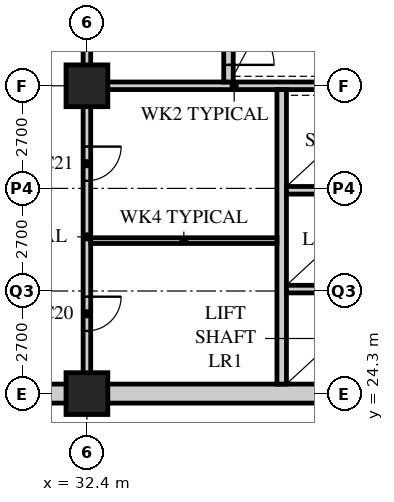
"""IFC4 building model, lengths in metres.
Left out: names, types, materials, properties, quantities, classifications, styles, units other than length and angle.
Written with IfcOpenShell. Run it as: python <this file> out.ifc"""

import sys

from ifc_helpers import new_model, si_unit, direction, frame, frame_2d, origin, origin_2d, place, context, subcontext, project, spatial, rectangle, hollow_rectangle, extrude, element, fill, save


model = new_model("IFC4")
c1 = context("Model", 3, precision=1e-05, world=origin(), true_north=direction((0.0, 1.0)))
c2 = subcontext(c1, "Body", "Model", "MODEL_VIEW")
j1 = project(units=[si_unit("LENGTHUNIT", "METRE"), si_unit("PLANEANGLEUNIT", "RADIAN")], contexts=[c1])
p1 = place(None, origin())
s1 = spatial("IfcSite", under=j1, at=p1, CompositionType="ELEMENT")
p2 = place(p1, origin())
s2 = spatial("IfcBuilding", under=s1, at=p2, CompositionType="ELEMENT")
p3 = place(p2, frame((0.0, 0.0, 106.8)))
s3 = spatial("IfcBuildingStorey", under=s2, at=p3, CompositionType="ELEMENT", Elevation=106.8)
for number, where, z_axis, x_axis in (
    (1, (32.4, 24.3, 0.0), (0.0, 0.0, 1.0), (1.0, 0.0, 0.0)),
    (2, (32.4, 32.4, 0.0), (0.0, 0.0, 1.0), (1.0, 0.0, 0.0)),
):
    element("IfcColumn", number, at=place(p3, frame(where, z_axis=z_axis, x_axis=x_axis)), inside=s3, PredefinedType="COLUMN", context=c2, shape_type="SweptSolid", body=[
        extrude(hollow_rectangle(XDim=1.1, YDim=1.1, WallThickness=0.1, at=origin_2d()), origin(), (0.0, 0.0, 1.0), 3.4),
    ])
p4 = place(p3, frame((15.95, 24.3, 0.0), z_axis=(0.0, 0.0, 1.0), x_axis=(1.0, 0.0, 0.0)))
e3 = element("IfcWall", 3, at=p4, inside=s3, PredefinedType="SOLIDWALL", context=c2, shape_type="SweptSolid", body=[
    extrude(rectangle(XDim=24.8, YDim=0.5, at=frame_2d((12.4, 0.0))), origin(), (0.0, 0.0, 1.0), 2.54),
])
p5 = place(p4, frame((11.5, 0.0, 0.0)))
e4 = element("IfcOpeningElement", 4, at=p5, cuts=e3, PredefinedType="OPENING", context=c2, shape_type="SweptSolid", body=[
    extrude(rectangle(XDim=1.8, YDim=2.4, at=frame_2d((0.9, 1.2))), frame((0.0, 0.26, 0.0), z_axis=(0.0, -1.0, 0.0), x_axis=(1.0, 0.0, 0.0)), (0.0, 0.0, 1.0), 0.52),
])
p6 = place(p3, frame((32.3, 32.4, 0.0), z_axis=(0.0, 0.0, 1.0), x_axis=(1.0, 0.0, 0.0)))
e5 = element("IfcWall", 5, at=p6, inside=s3, PredefinedType="SOLIDWALL", context=c2, shape_type="SweptSolid", body=[
    extrude(rectangle(XDim=7.95, YDim=0.2, at=frame_2d((3.975, 0.0))), origin(), (0.0, 0.0, 1.0), 2.578),
])
p7 = place(p3, frame((32.4, 32.5, 0.0), z_axis=(0.0, 0.0, 1.0), x_axis=(0.0, 1.0, 0.0)))
e6 = element("IfcWall", 6, at=p7, inside=s3, PredefinedType="SOLIDWALL", context=c2, shape_type="SweptSolid", body=[
    extrude(rectangle(XDim=7.75, YDim=0.2, at=frame_2d((3.875, 0.0))), origin(), (0.0, 0.0, 1.0), 2.578),
])
p8 = place(p7, frame((1.9, 0.0, 0.0)))
e7 = element("IfcOpeningElement", 7, at=p8, cuts=e6, PredefinedType="OPENING", context=c2, shape_type="SweptSolid", body=[
    extrude(rectangle(XDim=1.2, YDim=2.1, at=frame_2d((0.6, 1.05))), frame((0.0, 0.11, 0.0), z_axis=(0.0, -1.0, 0.0), x_axis=(1.0, 0.0, 0.0)), (0.0, 0.0, 1.0), 0.22),
])
p9 = place(p3, frame((37.525, 24.55, 0.0), z_axis=(0.0, 0.0, 1.0), x_axis=(0.0, 1.0, 0.0)))
e8 = element("IfcWall", 8, at=p9, inside=s3, PredefinedType="SOLIDWALL", context=c2, shape_type="SweptSolid", body=[
    extrude(rectangle(XDim=7.75, YDim=0.25, at=frame_2d((3.875, 0.0))), origin(), (0.0, 0.0, 1.0), 3.19),
])
for number, where, z_axis, x_axis in (
    (9, (37.65, 27.05, 0.0), (0.0, 0.0, 1.0), (1.0, 0.0, 0.0)),
    (10, (37.65, 29.65, 0.0), (0.0, 0.0, 1.0), (1.0, 0.0, 0.0)),
):
    element("IfcWall", number, at=place(p3, frame(where, z_axis=z_axis, x_axis=x_axis)), inside=s3, PredefinedType="SOLIDWALL", context=c2, shape_type="SweptSolid", body=[
        extrude(rectangle(XDim=2.6, YDim=0.2, at=frame_2d((1.3, 0.0))), origin(), (0.0, 0.0, 1.0), 3.19),
    ])
p10 = place(p3, frame((36.125, 32.5, 0.0), z_axis=(0.0, 0.0, 1.0), x_axis=(0.0, 1.0, 0.0)))
e11 = element("IfcWall", 11, at=p10, inside=s3, PredefinedType="SOLIDWALL", context=c2, shape_type="SweptSolid", body=[
    extrude(rectangle(XDim=7.75, YDim=0.25, at=frame_2d((3.875, 0.0))), origin(), (0.0, 0.0, 1.0), 3.19),
])
p11 = place(p10, frame((0.45, 0.0, 0.0)))
e12 = element("IfcOpeningElement", 12, at=p11, cuts=e11, PredefinedType="OPENING", context=c2, shape_type="SweptSolid", body=[
    extrude(rectangle(XDim=1.2, YDim=2.1, at=frame_2d((0.6, 1.05))), frame((0.0, 0.135, 0.0), z_axis=(0.0, -1.0, 0.0), x_axis=(1.0, 0.0, 0.0)), (0.0, 0.0, 1.0), 0.27),
])
p12 = place(p3, frame((32.4, 24.55, 0.0), z_axis=(0.0, 0.0, 1.0), x_axis=(0.0, 1.0, 0.0)))
e13 = element("IfcWall", 13, at=p12, inside=s3, PredefinedType="PARTITIONING", context=c2, shape_type="SweptSolid", body=[
    extrude(rectangle(XDim=7.75, YDim=0.2, at=frame_2d((3.875, 0.0))), origin(), (0.0, 0.0, 1.0), 2.578),
])
p13 = place(p12, frame((1.4, 0.0, 0.0)))
e14 = element("IfcOpeningElement", 14, at=p13, cuts=e13, PredefinedType="OPENING", context=c2, shape_type="SweptSolid", body=[
    extrude(rectangle(XDim=0.9, YDim=2.1, at=frame_2d((0.45, 1.05))), frame((0.0, 0.11, 0.0), z_axis=(0.0, -1.0, 0.0), x_axis=(1.0, 0.0, 0.0)), (0.0, 0.0, 1.0), 0.22),
])
p14 = place(p12, frame((5.35, 0.0, 0.0)))
e15 = element("IfcOpeningElement", 15, at=p14, cuts=e13, PredefinedType="OPENING", context=c2, shape_type="SweptSolid", body=[
    extrude(rectangle(XDim=0.9, YDim=2.1, at=frame_2d((0.45, 1.05))), frame((0.0, 0.11, 0.0), z_axis=(0.0, -1.0, 0.0), x_axis=(1.0, 0.0, 0.0)), (0.0, 0.0, 1.0), 0.22),
])
p15 = place(p3, frame((32.5, 28.325, 0.0), z_axis=(0.0, 0.0, 1.0), x_axis=(1.0, 0.0, 0.0)))
e16 = element("IfcWall", 16, at=p15, inside=s3, PredefinedType="PARTITIONING", context=c2, shape_type="SweptSolid", body=[
    extrude(rectangle(XDim=4.9, YDim=0.15, at=frame_2d((2.45, 0.0))), origin(), (0.0, 0.0, 1.0), 3.19),
])
p16 = place(p13, origin())
e17 = element("IfcDoor", 17, at=p16, inside=s3, OperationType="SINGLE_SWING_LEFT", PredefinedType="DOOR", context=c2, shape_type="SweptSolid", body=[
    extrude(rectangle(XDim=0.9, YDim=2.1, at=frame_2d((0.45, 1.05))), frame((0.0, 0.025, 0.0), z_axis=(0.0, -1.0, 0.0), x_axis=(1.0, 0.0, 0.0)), (0.0, 0.0, 1.0), 0.05),
])
fill(e14, e17)
p17 = place(p14, origin())
e18 = element("IfcDoor", 18, at=p17, inside=s3, OperationType="SINGLE_SWING_LEFT", PredefinedType="DOOR", context=c2, shape_type="SweptSolid", body=[
    extrude(rectangle(XDim=0.9, YDim=2.1, at=frame_2d((0.45, 1.05))), frame((0.0, 0.025, 0.0), z_axis=(0.0, -1.0, 0.0), x_axis=(1.0, 0.0, 0.0)), (0.0, 0.0, 1.0), 0.05),
])
fill(e15, e18)
p18 = place(p11, origin())
e19 = element("IfcDoor", 19, at=p18, inside=s3, OperationType="SINGLE_SWING_RIGHT", PredefinedType="DOOR", context=c2, shape_type="SweptSolid", body=[
    extrude(rectangle(XDim=1.2, YDim=2.1, at=frame_2d((0.6, 1.05))), frame((0.0, 0.025, 0.0), z_axis=(0.0, -1.0, 0.0), x_axis=(1.0, 0.0, 0.0)), (0.0, 0.0, 1.0), 0.05),
])
fill(e12, e19)
save(model, sys.argv[1])
